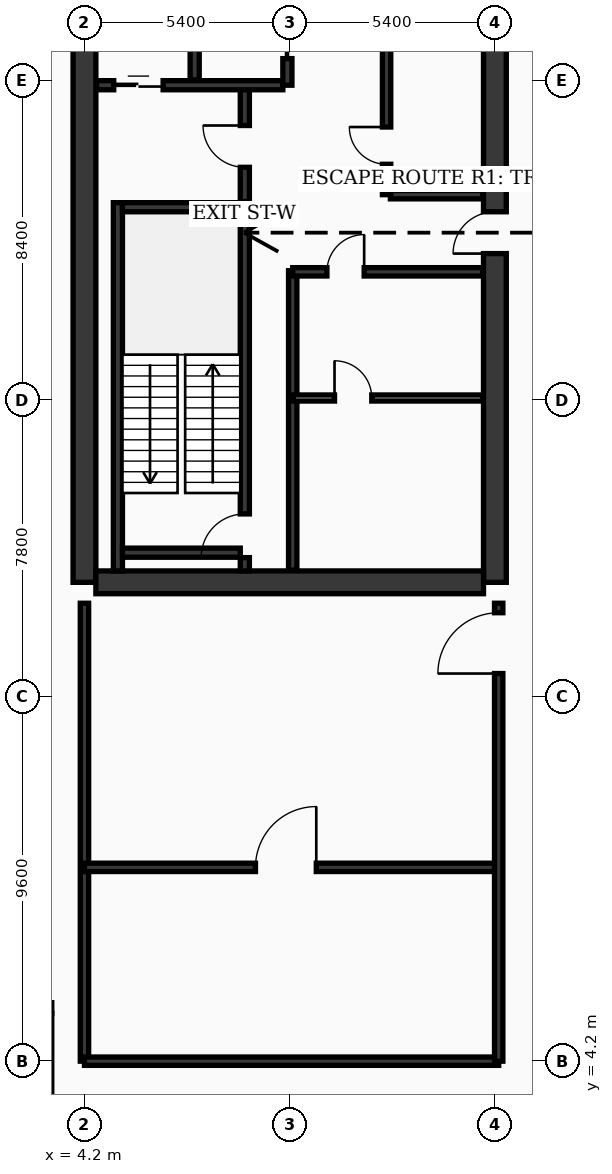
"""IFC4 building model, lengths in metres.
Left out: names, types, materials, properties, quantities, classifications, styles, units other than length and angle.
Written with IfcOpenShell. Run it as: python <this file> out.ifc"""

import sys

from ifc_helpers import new_model, si_unit, direction, frame, frame_2d, origin, origin_2d, place, context, subcontext, project, spatial, rectangle, hollow_rectangle, extrude, element, fill, save


model = new_model("IFC4")
c1 = context("Model", 3, precision=1e-05, world=origin(), true_north=direction((0.0, 1.0)))
c2 = subcontext(c1, "Body", "Model", "MODEL_VIEW")
j1 = project(units=[si_unit("LENGTHUNIT", "METRE"), si_unit("PLANEANGLEUNIT", "RADIAN")], contexts=[c1])
p1 = place(None, origin())
s1 = spatial("IfcSite", under=j1, at=p1, CompositionType="ELEMENT")
p2 = place(p1, origin())
s2 = spatial("IfcBuilding", under=s1, at=p2, CompositionType="ELEMENT")
p3 = place(p2, frame((0.0, 0.0, 282.5)))
s3 = spatial("IfcBuildingStorey", under=s2, at=p3, CompositionType="ELEMENT", Elevation=282.5)
p4 = place(p3, frame((4.2, 16.8, 0.0), z_axis=(0.0, 0.0, 1.0), x_axis=(0.0, 1.0, 0.0)))
e1 = element("IfcWall", 1, at=p4, inside=s3, PredefinedType="SHEAR", context=c2, shape_type="SweptSolid", body=[
    extrude(rectangle(XDim=21.6, YDim=0.6, at=frame_2d((10.8, 0.0))), origin(), (0.0, 0.0, 1.0), 4.35),
])
p5 = place(p3, frame((15.0, 16.8, 0.0), z_axis=(0.0, 0.0, 1.0), x_axis=(0.0, 1.0, 0.0)))
e2 = element("IfcWall", 2, at=p5, inside=s3, PredefinedType="SHEAR", context=c2, shape_type="SweptSolid", body=[
    extrude(rectangle(XDim=21.6, YDim=0.6, at=frame_2d((10.8, 0.0))), origin(), (0.0, 0.0, 1.0), 4.35),
])
p6 = place(p5, frame((8.65, 0.0, 0.0)))
e3 = element("IfcOpeningElement", 3, at=p6, cuts=e2, PredefinedType="OPENING", context=c2, shape_type="SweptSolid", body=[
    extrude(rectangle(XDim=1.1, YDim=2.2, at=frame_2d((0.55, 1.1))), frame((0.0, 0.31, 0.0), z_axis=(0.0, -1.0, 0.0), x_axis=(1.0, 0.0, 0.0)), (0.0, 0.0, 1.0), 0.62),
])
p7 = place(p5, frame((18.9, 0.0, 0.0)))
e4 = element("IfcOpeningElement", 4, at=p7, cuts=e2, PredefinedType="OPENING", context=c2, shape_type="SweptSolid", body=[
    extrude(rectangle(XDim=1.1, YDim=2.2, at=frame_2d((0.55, 1.1))), frame((0.0, 0.31, 0.0), z_axis=(0.0, -1.0, 0.0), x_axis=(1.0, 0.0, 0.0)), (0.0, 0.0, 1.0), 0.62),
])
p8 = place(p3, frame((4.5, 16.8, 0.0), z_axis=(0.0, 0.0, 1.0), x_axis=(1.0, 0.0, 0.0)))
e5 = element("IfcWall", 5, at=p8, inside=s3, PredefinedType="SHEAR", context=c2, shape_type="SweptSolid", body=[
    extrude(rectangle(XDim=10.2, YDim=0.6, at=frame_2d((5.1, 0.0))), origin(), (0.0, 0.0, 1.0), 4.35),
])
p9 = place(p3, frame((5.08, 17.1, 0.0), z_axis=(0.0, 0.0, 1.0), x_axis=(0.0, 1.0, 0.0)))
e6 = element("IfcWall", 6, at=p9, inside=s3, PredefinedType="SOLIDWALL", context=c2, shape_type="SweptSolid", body=[
    extrude(rectangle(XDim=9.69, YDim=0.24, at=frame_2d((4.845, 0.0))), origin(), (0.0, 0.0, 1.0), 4.35),
])
p10 = place(p3, frame((8.42, 17.1, 0.0), z_axis=(0.0, 0.0, 1.0), x_axis=(0.0, 1.0, 0.0)))
e7 = element("IfcWall", 7, at=p10, inside=s3, PredefinedType="SOLIDWALL", context=c2, shape_type="SweptSolid", body=[
    extrude(rectangle(XDim=9.69, YDim=0.24, at=frame_2d((4.845, 0.0))), origin(), (0.0, 0.0, 1.0), 4.35),
])
p11 = place(p10, frame((0.35, 0.0, 0.0)))
e8 = element("IfcOpeningElement", 8, at=p11, cuts=e7, PredefinedType="OPENING", context=c2, shape_type="SweptSolid", body=[
    extrude(rectangle(XDim=1.15, YDim=2.2, at=frame_2d((0.575, 1.1))), frame((0.0, 0.13, 0.0), z_axis=(0.0, -1.0, 0.0), x_axis=(1.0, 0.0, 0.0)), (0.0, 0.0, 1.0), 0.26),
])
for number, where, z_axis, x_axis in (
    (9, (5.2, 17.58, 0.0), (0.0, 0.0, 1.0), (1.0, 0.0, 0.0)),
    (10, (5.2, 26.67, 0.0), (0.0, 0.0, 1.0), (1.0, 0.0, 0.0)),
):
    element("IfcWall", number, at=place(p3, frame(where, z_axis=z_axis, x_axis=x_axis)), inside=s3, PredefinedType="SOLIDWALL", context=c2, shape_type="SweptSolid", body=[
        extrude(rectangle(XDim=3.1, YDim=0.24, at=frame_2d((1.55, 0.0))), origin(), (0.0, 0.0, 1.0), 4.35),
    ])
p12 = place(p3, frame((3.6, 3.6, 0.0), z_axis=(0.0, 0.0, 1.0), x_axis=(1.0, 0.0, 0.0)))
e11 = element("IfcColumn", 11, at=p12, inside=s3, PredefinedType="COLUMN", context=c2, shape_type="SweptSolid", body=[
    extrude(hollow_rectangle(XDim=0.75, YDim=0.75, WallThickness=0.032, at=origin_2d()), origin(), (0.0, 0.0, 1.0), 4.35),
])
p13 = place(p3, frame((12.6, 3.6, 0.0), z_axis=(0.0, 0.0, 1.0), x_axis=(1.0, 0.0, 0.0)))
e12 = element("IfcColumn", 12, at=p13, inside=s3, PredefinedType="COLUMN", context=c2, shape_type="SweptSolid", body=[
    extrude(rectangle(XDim=0.92, YDim=0.92, at=origin_2d()), origin(), (0.0, 0.0, 1.0), 4.35),
])
p14 = place(p3, frame((8.42, 26.82, 0.0), z_axis=(0.0, 0.0, 1.0), x_axis=(0.0, 1.0, 0.0)))
e13 = element("IfcWall", 13, at=p14, inside=s3, PredefinedType="SOLIDWALL", context=c2, shape_type="SweptSolid", body=[
    extrude(rectangle(XDim=3.0, YDim=0.24, at=frame_2d((1.5, 0.0))), origin(), (0.0, 0.0, 1.0), 4.35),
])
p15 = place(p14, frame((0.9, 0.0, 0.0)))
e14 = element("IfcOpeningElement", 14, at=p15, cuts=e13, PredefinedType="OPENING", context=c2, shape_type="SweptSolid", body=[
    extrude(rectangle(XDim=1.1, YDim=2.2, at=frame_2d((0.55, 1.1))), frame((0.0, 0.13, 0.0), z_axis=(0.0, -1.0, 0.0), x_axis=(1.0, 0.0, 0.0)), (0.0, 0.0, 1.0), 0.26),
])
p16 = place(p3, frame((4.52, 29.88, 0.0), z_axis=(0.0, 0.0, 1.0), x_axis=(1.0, 0.0, 0.0)))
e15 = element("IfcWall", 15, at=p16, inside=s3, PredefinedType="SOLIDWALL", context=c2, shape_type="SweptSolid", body=[
    extrude(rectangle(XDim=4.9, YDim=0.24, at=frame_2d((2.45, 0.0))), origin(), (0.0, 0.0, 1.0), 4.35),
])
p17 = place(p16, frame((0.45, 0.0, 0.0)))
e16 = element("IfcOpeningElement", 16, at=p17, cuts=e15, PredefinedType="OPENING", context=c2, shape_type="SweptSolid", body=[
    extrude(rectangle(XDim=1.3, YDim=2.35, at=frame_2d((0.65, 1.175))), frame((0.0, 0.13, 0.0), z_axis=(0.0, -1.0, 0.0), x_axis=(1.0, 0.0, 0.0)), (0.0, 0.0, 1.0), 0.26),
])
p18 = place(p3, frame((7.1, 30.02, 0.0), z_axis=(0.0, 0.0, 1.0), x_axis=(0.0, 1.0, 0.0)))
e17 = element("IfcWall", 17, at=p18, inside=s3, PredefinedType="SOLIDWALL", context=c2, shape_type="SweptSolid", body=[
    extrude(rectangle(XDim=2.63, YDim=0.24, at=frame_2d((1.315, 0.0))), origin(), (0.0, 0.0, 1.0), 4.35),
])
p19 = place(p3, frame((9.54, 29.88, 0.0), z_axis=(0.0, 0.0, 1.0), x_axis=(0.0, 1.0, 0.0)))
e18 = element("IfcWall", 18, at=p19, inside=s3, PredefinedType="SOLIDWALL", context=c2, shape_type="SweptSolid", body=[
    extrude(rectangle(XDim=2.9, YDim=0.24, at=frame_2d((1.45, 0.0))), origin(), (0.0, 0.0, 1.0), 4.35),
])
p20 = place(p19, frame((0.7, 0.0, 0.0)))
e19 = element("IfcOpeningElement", 19, at=p20, cuts=e18, PredefinedType="OPENING", context=c2, shape_type="SweptSolid", body=[
    extrude(rectangle(XDim=1.3, YDim=2.35, at=frame_2d((0.65, 1.175))), frame((0.0, 0.13, 0.0), z_axis=(0.0, -1.0, 0.0), x_axis=(1.0, 0.0, 0.0)), (0.0, 0.0, 1.0), 0.26),
])
p21 = place(p3, frame((9.68, 17.12, 0.0), z_axis=(0.0, 0.0, 1.0), x_axis=(0.0, 1.0, 0.0)))
e20 = element("IfcWall", 20, at=p21, inside=s3, PredefinedType="SOLIDWALL", context=c2, shape_type="SweptSolid", body=[
    extrude(rectangle(XDim=7.88, YDim=0.22, at=frame_2d((3.94, 0.0))), origin(), (0.0, 0.0, 1.0), 4.35),
])
p22 = place(p3, frame((9.68, 21.65, 0.0), z_axis=(0.0, 0.0, 1.0), x_axis=(1.0, 0.0, 0.0)))
e21 = element("IfcWall", 21, at=p22, inside=s3, PredefinedType="PARTITIONING", context=c2, shape_type="SweptSolid", body=[
    extrude(rectangle(XDim=5.0, YDim=0.16, at=frame_2d((2.5, 0.0))), origin(), (0.0, 0.0, 1.0), 4.35),
])
p23 = place(p22, frame((1.1, 0.0, 0.0)))
e22 = element("IfcOpeningElement", 22, at=p23, cuts=e21, PredefinedType="OPENING", context=c2, shape_type="SweptSolid", body=[
    extrude(rectangle(XDim=0.98, YDim=2.15, at=frame_2d((0.49, 1.075))), frame((0.0, 0.09, 0.0), z_axis=(0.0, -1.0, 0.0), x_axis=(1.0, 0.0, 0.0)), (0.0, 0.0, 1.0), 0.18),
])
p24 = place(p3, frame((9.68, 24.97, 0.0), z_axis=(0.0, 0.0, 1.0), x_axis=(1.0, 0.0, 0.0)))
e23 = element("IfcWall", 23, at=p24, inside=s3, PredefinedType="SOLIDWALL", context=c2, shape_type="SweptSolid", body=[
    extrude(rectangle(XDim=5.0, YDim=0.22, at=frame_2d((2.5, 0.0))), origin(), (0.0, 0.0, 1.0), 3.8),
])
p25 = place(p24, frame((0.9, 0.0, 0.0)))
e24 = element("IfcOpeningElement", 24, at=p25, cuts=e23, PredefinedType="OPENING", context=c2, shape_type="SweptSolid", body=[
    extrude(rectangle(XDim=0.98, YDim=2.15, at=frame_2d((0.49, 1.075))), frame((0.0, 0.12, 0.0), z_axis=(0.0, -1.0, 0.0), x_axis=(1.0, 0.0, 0.0)), (0.0, 0.0, 1.0), 0.24),
])
p26 = place(p3, frame((12.25, 27.0, 0.0), z_axis=(0.0, 0.0, 1.0), x_axis=(1.0, 0.0, 0.0)))
e25 = element("IfcWall", 25, at=p26, inside=s3, PredefinedType="SOLIDWALL", context=c2, shape_type="SweptSolid", body=[
    extrude(rectangle(XDim=2.43, YDim=0.22, at=frame_2d((1.215, 0.0))), origin(), (0.0, 0.0, 1.0), 4.35),
])
p27 = place(p3, frame((12.15, 27.0, 0.0), z_axis=(0.0, 0.0, 1.0), x_axis=(0.0, 1.0, 0.0)))
e26 = element("IfcWall", 26, at=p27, inside=s3, PredefinedType="SOLIDWALL", context=c2, shape_type="SweptSolid", body=[
    extrude(rectangle(XDim=7.75, YDim=0.22, at=frame_2d((3.875, 0.0))), origin(), (0.0, 0.0, 1.0), 4.35),
])
p28 = place(p27, frame((0.8, 0.0, 0.0)))
e27 = element("IfcOpeningElement", 27, at=p28, cuts=e26, PredefinedType="OPENING", context=c2, shape_type="SweptSolid", body=[
    extrude(rectangle(XDim=0.98, YDim=2.15, at=frame_2d((0.49, 1.075))), frame((0.0, 0.12, 0.0), z_axis=(0.0, -1.0, 0.0), x_axis=(1.0, 0.0, 0.0)), (0.0, 0.0, 1.0), 0.24),
])
p29 = place(p3, frame((4.2, 4.2, 0.0), z_axis=(0.0, 0.0, 1.0), x_axis=(0.0, 1.0, 0.0)))
e28 = element("IfcWall", 28, at=p29, inside=s3, PredefinedType="SOLIDWALL", context=c2, shape_type="SweptSolid", body=[
    extrude(rectangle(XDim=12.05, YDim=0.22, at=frame_2d((6.025, 0.0))), origin(), (0.0, 0.0, 1.0), 3.8),
])
p30 = place(p3, frame((4.2, 4.2, 0.0), z_axis=(0.0, 0.0, 1.0), x_axis=(1.0, 0.0, 0.0)))
e29 = element("IfcWall", 29, at=p30, inside=s3, PredefinedType="SOLIDWALL", context=c2, shape_type="SweptSolid", body=[
    extrude(rectangle(XDim=10.9, YDim=0.22, at=frame_2d((5.45, 0.0))), origin(), (0.0, 0.0, 1.0), 3.8),
])
p31 = place(p3, frame((4.2, 9.3, 0.0), z_axis=(0.0, 0.0, 1.0), x_axis=(1.0, 0.0, 0.0)))
e30 = element("IfcWall", 30, at=p31, inside=s3, PredefinedType="SOLIDWALL", context=c2, shape_type="SweptSolid", body=[
    extrude(rectangle(XDim=10.9, YDim=0.22, at=frame_2d((5.45, 0.0))), origin(), (0.0, 0.0, 1.0), 3.8),
])
p32 = place(p31, frame((4.5, 0.0, 0.0)))
e31 = element("IfcOpeningElement", 31, at=p32, cuts=e30, PredefinedType="OPENING", context=c2, shape_type="SweptSolid", body=[
    extrude(rectangle(XDim=1.6, YDim=2.35, at=frame_2d((0.8, 1.175))), frame((0.0, 0.12, 0.0), z_axis=(0.0, -1.0, 0.0), x_axis=(1.0, 0.0, 0.0)), (0.0, 0.0, 1.0), 0.24),
])
p33 = place(p3, frame((15.1, 4.2, 0.0), z_axis=(0.0, 0.0, 1.0), x_axis=(0.0, 1.0, 0.0)))
e32 = element("IfcWall", 32, at=p33, inside=s3, PredefinedType="SOLIDWALL", context=c2, shape_type="SweptSolid", body=[
    extrude(rectangle(XDim=12.05, YDim=0.22, at=frame_2d((6.025, 0.0))), origin(), (0.0, 0.0, 1.0), 3.4),
])
p34 = place(p33, frame((10.2, 0.0, 0.0)))
e33 = element("IfcOpeningElement", 33, at=p34, cuts=e32, PredefinedType="OPENING", context=c2, shape_type="SweptSolid", body=[
    extrude(rectangle(XDim=1.6, YDim=2.35, at=frame_2d((0.8, 1.175))), frame((0.0, 0.12, 0.0), z_axis=(0.0, -1.0, 0.0), x_axis=(1.0, 0.0, 0.0)), (0.0, 0.0, 1.0), 0.24),
])
p35 = place(p15, origin())
e34 = element("IfcDoor", 34, at=p35, inside=s3, OperationType="SINGLE_SWING_RIGHT", PredefinedType="DOOR", context=c2, shape_type="SweptSolid", body=[
    extrude(rectangle(XDim=1.1, YDim=2.2, at=frame_2d((0.55, 1.1))), frame((0.0, 0.025, 0.0), z_axis=(0.0, -1.0, 0.0), x_axis=(1.0, 0.0, 0.0)), (0.0, 0.0, 1.0), 0.05),
])
fill(e14, e34)
p36 = place(p17, origin())
e35 = element("IfcDoor", 35, at=p36, inside=s3, OperationType="DOUBLE_DOOR_SLIDING", PredefinedType="DOOR", context=c2, shape_type="SweptSolid", body=[
    extrude(rectangle(XDim=1.3, YDim=2.35, at=frame_2d((0.65, 1.175))), frame((0.0, 0.025, 0.0), z_axis=(0.0, -1.0, 0.0), x_axis=(1.0, 0.0, 0.0)), (0.0, 0.0, 1.0), 0.05),
])
fill(e16, e35)
p37 = place(p20, origin())
e36 = element("IfcDoor", 36, at=p37, inside=s3, OperationType="DOUBLE_DOOR_SLIDING", PredefinedType="DOOR", context=c2, shape_type="SweptSolid", body=[
    extrude(rectangle(XDim=1.3, YDim=2.35, at=frame_2d((0.65, 1.175))), frame((0.0, 0.025, 0.0), z_axis=(0.0, -1.0, 0.0), x_axis=(1.0, 0.0, 0.0)), (0.0, 0.0, 1.0), 0.05),
])
fill(e19, e36)
p38 = place(p23, origin())
e37 = element("IfcDoor", 37, at=p38, inside=s3, OperationType="SINGLE_SWING_LEFT", PredefinedType="DOOR", context=c2, shape_type="SweptSolid", body=[
    extrude(rectangle(XDim=0.98, YDim=2.15, at=frame_2d((0.49, 1.075))), frame((0.0, 0.025, 0.0), z_axis=(0.0, -1.0, 0.0), x_axis=(1.0, 0.0, 0.0)), (0.0, 0.0, 1.0), 0.05),
])
fill(e22, e37)
p39 = place(p25, origin())
e38 = element("IfcDoor", 38, at=p39, inside=s3, OperationType="SINGLE_SWING_RIGHT", PredefinedType="DOOR", context=c2, shape_type="SweptSolid", body=[
    extrude(rectangle(XDim=0.98, YDim=2.15, at=frame_2d((0.49, 1.075))), frame((0.0, 0.025, 0.0), z_axis=(0.0, -1.0, 0.0), x_axis=(1.0, 0.0, 0.0)), (0.0, 0.0, 1.0), 0.05),
])
fill(e24, e38)
p40 = place(p28, origin())
e39 = element("IfcDoor", 39, at=p40, inside=s3, OperationType="SINGLE_SWING_RIGHT", PredefinedType="DOOR", context=c2, shape_type="SweptSolid", body=[
    extrude(rectangle(XDim=0.98, YDim=2.15, at=frame_2d((0.49, 1.075))), frame((0.0, 0.025, 0.0), z_axis=(0.0, -1.0, 0.0), x_axis=(1.0, 0.0, 0.0)), (0.0, 0.0, 1.0), 0.05),
])
fill(e27, e39)
p41 = place(p32, origin())
e40 = element("IfcDoor", 40, at=p41, inside=s3, OperationType="SINGLE_SWING_RIGHT", PredefinedType="DOOR", context=c2, shape_type="SweptSolid", body=[
    extrude(rectangle(XDim=1.6, YDim=2.35, at=frame_2d((0.8, 1.175))), frame((0.0, 0.025, 0.0), z_axis=(0.0, -1.0, 0.0), x_axis=(1.0, 0.0, 0.0)), (0.0, 0.0, 1.0), 0.05),
])
fill(e31, e40)
p42 = place(p34, origin())
e41 = element("IfcDoor", 41, at=p42, inside=s3, OperationType="SINGLE_SWING_LEFT", PredefinedType="DOOR", context=c2, shape_type="SweptSolid", body=[
    extrude(rectangle(XDim=1.6, YDim=2.35, at=frame_2d((0.8, 1.175))), frame((0.0, 0.025, 0.0), z_axis=(0.0, -1.0, 0.0), x_axis=(1.0, 0.0, 0.0)), (0.0, 0.0, 1.0), 0.05),
])
fill(e33, e41)
p43 = place(p11, origin())
e42 = element("IfcDoor", 42, at=p43, inside=s3, OperationType="SINGLE_SWING_LEFT", PredefinedType="DOOR", context=c2, shape_type="SweptSolid", body=[
    extrude(rectangle(XDim=1.15, YDim=2.2, at=frame_2d((0.575, 1.1))), frame((0.0, 0.025, 0.0), z_axis=(0.0, -1.0, 0.0), x_axis=(1.0, 0.0, 0.0)), (0.0, 0.0, 1.0), 0.05),
])
fill(e8, e42)
p44 = place(p6, origin())
e43 = element("IfcDoor", 43, at=p44, inside=s3, OperationType="SINGLE_SWING_LEFT", PredefinedType="DOOR", context=c2, shape_type="SweptSolid", body=[
    extrude(rectangle(XDim=1.1, YDim=2.2, at=frame_2d((0.55, 1.1))), frame((0.0, 0.025, 0.0), z_axis=(0.0, -1.0, 0.0), x_axis=(1.0, 0.0, 0.0)), (0.0, 0.0, 1.0), 0.05),
])
fill(e3, e43)
save(model, sys.argv[1])
